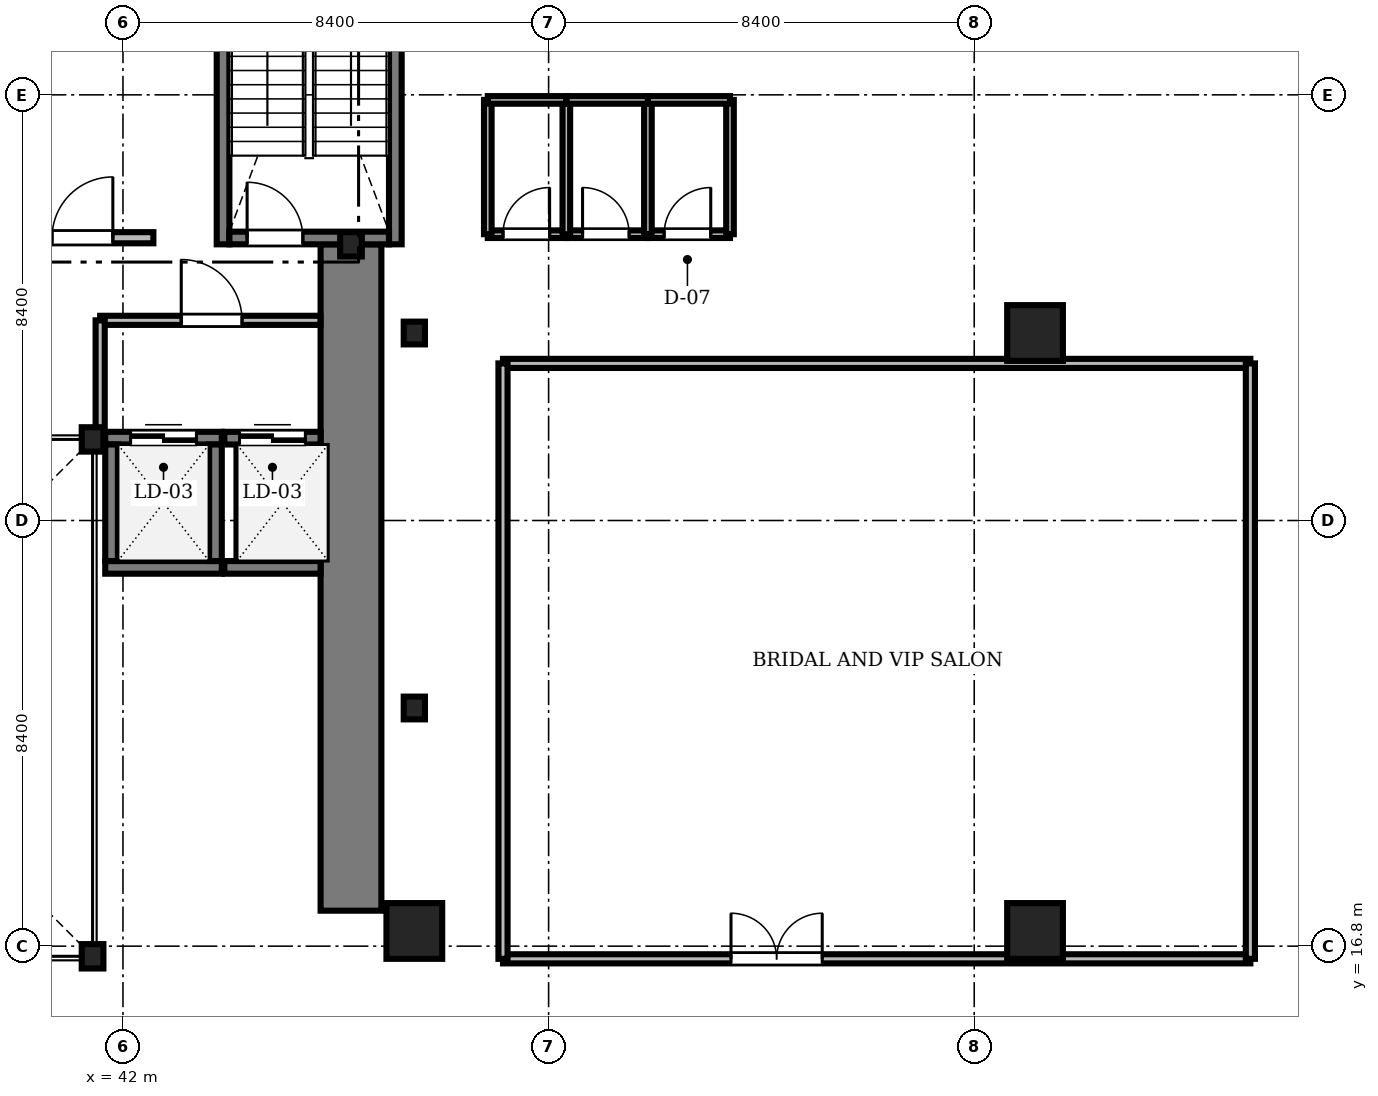
"""IFC4 building model, lengths in metres.
Left out: names, types, materials, properties, quantities, classifications, styles, units other than length and angle.
Written with IfcOpenShell. Run it as: python <this file> out.ifc"""

import sys

from ifc_helpers import new_model, si_unit, direction, frame, frame_2d, origin, origin_2d, place, context, subcontext, project, spatial, rectangle, i_section, extrude, source, transform, mapped, element, fill, save


model = new_model("IFC4")
c1 = context("Model", 3, precision=1e-05, world=origin(), true_north=direction((0.0, 1.0)))
c2 = subcontext(c1, "Body", "Model", "MODEL_VIEW")
j1 = project(units=[si_unit("LENGTHUNIT", "METRE"), si_unit("PLANEANGLEUNIT", "RADIAN")], contexts=[c1])
p1 = place(None, origin())
s1 = spatial("IfcSite", under=j1, at=p1, CompositionType="ELEMENT")
p2 = place(p1, origin())
s2 = spatial("IfcBuilding", under=s1, at=p2, CompositionType="ELEMENT")
p3 = place(p2, frame((0.0, 0.0, 17.0)))
s3 = spatial("IfcBuildingStorey", under=s2, at=p3, CompositionType="ELEMENT", Elevation=17.0)
m1 = source(origin(), c2, "Body", "SweptSolid", [
    extrude(rectangle(XDim=13.15, YDim=1.2, at=frame_2d((6.575, 0.0))), origin(), (0.0, 0.0, 1.0), 5.08),
])
p4 = place(p3, frame((46.5, 17.5, 0.0), z_axis=(0.0, 0.0, 1.0), x_axis=(0.0, 1.0, 0.0)))
e1 = element("IfcWall", 1, at=p4, inside=s3, PredefinedType="SHEAR", context=c2, shape_type="MappedRepresentation", body=[
    mapped(m1, transform((0.0, 0.0, 0.0), scale=1.0)),
])
m2 = source(origin(), c2, "Body", "SweptSolid", [
    extrude(i_section(OverallWidth=0.428, OverallDepth=0.481, WebThickness=0.04, FlangeThickness=0.063, FilletRadius=0.015, at=origin_2d()), origin(), (0.0, 0.0, 1.0), 5.08),
])
for number, where, z_axis, x_axis in (
    (2, (41.4, 16.6, 0.0), (0.0, 0.0, 1.0), (1.0, 0.0, 0.0)),
    (3, (41.4, 26.8, 0.0), (0.0, 0.0, 1.0), (1.0, 0.0, 0.0)),
    (4, (46.5, 30.65, 0.0), (0.0, 0.0, 1.0), (1.0, 0.0, 0.0)),
):
    element("IfcColumn", number, at=place(p3, frame(where, z_axis=z_axis, x_axis=x_axis)), inside=s3, PredefinedType="COLUMN", context=c2, shape_type="MappedRepresentation", body=[
        mapped(m2, transform((0.0, 0.0, 0.0), scale=1.0)),
    ])
m3 = source(origin(), c2, "Body", "SweptSolid", [
    extrude(rectangle(XDim=1.1, YDim=1.1, at=origin_2d()), origin(), (0.0, 0.0, 1.0), 5.08),
])
for number, where, z_axis, x_axis in (
    (5, (47.75, 17.1, 0.0), (0.0, 0.0, 1.0), (1.0, 0.0, 0.0)),
    (6, (60.0, 17.1, 0.0), (0.0, 0.0, 1.0), (1.0, 0.0, 0.0)),
    (7, (60.0, 28.9, 0.0), (0.0, 0.0, 1.0), (1.0, 0.0, 0.0)),
):
    element("IfcColumn", number, at=place(p3, frame(where, z_axis=z_axis, x_axis=x_axis)), inside=s3, PredefinedType="COLUMN", context=c2, shape_type="MappedRepresentation", body=[
        mapped(m3, transform((0.0, 0.0, 0.0), scale=1.0)),
    ])
m4 = source(origin(), c2, "Body", "SweptSolid", [
    extrude(i_section(OverallWidth=0.419, OverallDepth=0.449, WebThickness=0.031, FlangeThickness=0.048, FilletRadius=0.015, at=origin_2d()), origin(), (0.0, 0.0, 1.0), 5.08),
])
for number, where, z_axis, x_axis in (
    (8, (47.75, 21.5, 0.0), (0.0, 0.0, 1.0), (1.0, 0.0, 0.0)),
    (9, (47.75, 28.9, 0.0), (0.0, 0.0, 1.0), (1.0, 0.0, 0.0)),
):
    element("IfcColumn", number, at=place(p3, frame(where, z_axis=z_axis, x_axis=x_axis)), inside=s3, PredefinedType="COLUMN", context=c2, shape_type="MappedRepresentation", body=[
        mapped(m4, transform((0.0, 0.0, 0.0), scale=1.0)),
    ])
m5 = source(origin(), c2, "Body", "SweptSolid", [
    extrude(rectangle(XDim=9.05, YDim=0.25, at=frame_2d((4.525, 0.0))), origin(), (0.0, 0.0, 1.0), 5.2),
])
for number, where, z_axis, x_axis in (
    (10, (43.975, 30.65, 0.0), (0.0, 0.0, 1.0), (0.0, 1.0, 0.0)),
    (11, (47.375, 30.65, 0.0), (0.0, 0.0, 1.0), (0.0, 1.0, 0.0)),
):
    element("IfcWall", number, at=place(p3, frame(where, z_axis=z_axis, x_axis=x_axis)), inside=s3, PredefinedType="SOLIDWALL", context=c2, shape_type="MappedRepresentation", body=[
        mapped(m5, transform((0.0, 0.0, 0.0), scale=1.0)),
    ])
m6 = source(origin(), c2, "Body", "SweptSolid", [
    extrude(rectangle(XDim=3.15, YDim=0.25, at=frame_2d((1.575, 0.0))), origin(), (0.0, 0.0, 1.0), 5.2),
])
p5 = place(p3, frame((44.1, 30.775, 0.0), z_axis=(0.0, 0.0, 1.0), x_axis=(1.0, 0.0, 0.0)))
e12 = element("IfcWall", 12, at=p5, inside=s3, PredefinedType="SOLIDWALL", context=c2, shape_type="MappedRepresentation", body=[
    mapped(m6, transform((0.0, 0.0, 0.0), scale=1.0)),
])
m7 = source(origin(), c2, "Body", "SweptSolid", [
    extrude(rectangle(XDim=1.1, YDim=2.2, at=frame_2d((0.55, 1.1))), frame((0.0, 0.135, 0.0), z_axis=(0.0, -1.0, 0.0), x_axis=(1.0, 0.0, 0.0)), (0.0, 0.0, 1.0), 0.27),
])
p6 = place(p5, frame((0.35, 0.0, 0.0)))
e13 = element("IfcOpeningElement", 13, at=p6, cuts=e12, PredefinedType="OPENING", context=c2, shape_type="MappedRepresentation", body=[
    mapped(m7, transform((0.0, 0.0, 0.0), scale=1.0)),
])
m8 = source(origin(), c2, "Body", "SweptSolid", [
    extrude(rectangle(XDim=2.8, YDim=0.22, at=frame_2d((1.4, 0.0))), origin(), (0.0, 0.0, 1.0), 5.08),
])
p7 = place(p3, frame((39.8, 30.78, 0.0), z_axis=(0.0, 0.0, 1.0), x_axis=(1.0, 0.0, 0.0)))
e14 = element("IfcWall", 14, at=p7, inside=s3, PredefinedType="SOLIDWALL", context=c2, shape_type="MappedRepresentation", body=[
    mapped(m8, transform((0.0, 0.0, 0.0), scale=1.0)),
])
m9 = source(origin(), c2, "Body", "SweptSolid", [
    extrude(rectangle(XDim=1.2, YDim=2.2, at=frame_2d((0.6, 1.1))), frame((0.0, 0.12, 0.0), z_axis=(0.0, -1.0, 0.0), x_axis=(1.0, 0.0, 0.0)), (0.0, 0.0, 1.0), 0.24),
])
p8 = place(p7, frame((0.8, 0.0, 0.0)))
e15 = element("IfcOpeningElement", 15, at=p8, cuts=e14, PredefinedType="OPENING", context=c2, shape_type="MappedRepresentation", body=[
    mapped(m9, transform((0.0, 0.0, 0.0), scale=1.0)),
])
m10 = source(origin(), c2, "Body", "SweptSolid", [
    extrude(rectangle(XDim=2.3, YDim=0.25, at=frame_2d((1.15, 0.0))), origin(), (0.0, 0.0, 1.0), 5.08),
])
p9 = place(p3, frame((41.65, 24.275, 0.0), z_axis=(0.0, 0.0, 1.0), x_axis=(1.0, 0.0, 0.0)))
e16 = element("IfcWall", 16, at=p9, inside=s3, PredefinedType="SOLIDWALL", context=c2, shape_type="MappedRepresentation", body=[
    mapped(m10, transform((0.0, 0.0, 0.0), scale=1.0)),
])
p10 = place(p3, frame((41.65, 26.825, 0.0), z_axis=(0.0, 0.0, 1.0), x_axis=(1.0, 0.0, 0.0)))
e17 = element("IfcWall", 17, at=p10, inside=s3, PredefinedType="SOLIDWALL", context=c2, shape_type="MappedRepresentation", body=[
    mapped(m10, transform((0.0, 0.0, 0.0), scale=1.0)),
])
m11 = source(origin(), c2, "Body", "SweptSolid", [
    extrude(rectangle(XDim=1.3, YDim=2.3, at=frame_2d((0.65, 1.15))), frame((0.0, 0.135, 0.0), z_axis=(0.0, -1.0, 0.0), x_axis=(1.0, 0.0, 0.0)), (0.0, 0.0, 1.0), 0.27),
])
p11 = place(p10, frame((0.5, 0.0, 0.0)))
e18 = element("IfcOpeningElement", 18, at=p11, cuts=e17, PredefinedType="OPENING", context=c2, shape_type="MappedRepresentation", body=[
    mapped(m11, transform((0.0, 0.0, 0.0), scale=1.0)),
])
for number, where, z_axis, x_axis in (
    (19, (41.775, 24.4, 0.0), (0.0, 0.0, 1.0), (0.0, 1.0, 0.0)),
    (20, (43.825, 24.4, 0.0), (0.0, 0.0, 1.0), (0.0, 1.0, 0.0)),
):
    element("IfcWall", number, at=place(p3, frame(where, z_axis=z_axis, x_axis=x_axis)), inside=s3, PredefinedType="SOLIDWALL", context=c2, shape_type="MappedRepresentation", body=[
        mapped(m10, transform((0.0, 0.0, 0.0), scale=1.0)),
    ])
m12 = source(origin(), c2, "Body", "SweptSolid", [
    extrude(rectangle(XDim=1.9, YDim=0.25, at=frame_2d((0.95, 0.0))), origin(), (0.0, 0.0, 1.0), 5.08),
])
p12 = place(p3, frame((44.0, 24.275, 0.0), z_axis=(0.0, 0.0, 1.0), x_axis=(1.0, 0.0, 0.0)))
e21 = element("IfcWall", 21, at=p12, inside=s3, PredefinedType="SOLIDWALL", context=c2, shape_type="MappedRepresentation", body=[
    mapped(m12, transform((0.0, 0.0, 0.0), scale=1.0)),
])
p13 = place(p3, frame((44.0, 26.825, 0.0), z_axis=(0.0, 0.0, 1.0), x_axis=(1.0, 0.0, 0.0)))
e22 = element("IfcWall", 22, at=p13, inside=s3, PredefinedType="SOLIDWALL", context=c2, shape_type="MappedRepresentation", body=[
    mapped(m12, transform((0.0, 0.0, 0.0), scale=1.0)),
])
p14 = place(p13, frame((0.3, 0.0, 0.0)))
e23 = element("IfcOpeningElement", 23, at=p14, cuts=e22, PredefinedType="OPENING", context=c2, shape_type="MappedRepresentation", body=[
    mapped(m11, transform((0.0, 0.0, 0.0), scale=1.0)),
])
m13 = source(origin(), c2, "Body", "SweptSolid", [
    extrude(rectangle(XDim=14.75, YDim=0.18, at=frame_2d((7.375, 0.0))), origin(), (0.0, 0.0, 1.0), 4.472),
])
p15 = place(p3, frame((49.5, 16.55, 0.0), z_axis=(0.0, 0.0, 1.0), x_axis=(1.0, 0.0, 0.0)))
e24 = element("IfcWall", 24, at=p15, inside=s3, PredefinedType="PARTITIONING", context=c2, shape_type="MappedRepresentation", body=[
    mapped(m13, transform((0.0, 0.0, 0.0), scale=1.0)),
])
m14 = source(origin(), c2, "Body", "SweptSolid", [
    extrude(rectangle(XDim=1.8, YDim=2.4, at=frame_2d((0.9, 1.2))), frame((0.0, 0.1, 0.0), z_axis=(0.0, -1.0, 0.0), x_axis=(1.0, 0.0, 0.0)), (0.0, 0.0, 1.0), 0.2),
])
p16 = place(p15, frame((4.5, 0.0, 0.0)))
e25 = element("IfcOpeningElement", 25, at=p16, cuts=e24, PredefinedType="OPENING", context=c2, shape_type="MappedRepresentation", body=[
    mapped(m14, transform((0.0, 0.0, 0.0), scale=1.0)),
])
m15 = source(origin(), c2, "Body", "SweptSolid", [
    extrude(rectangle(XDim=4.348, YDim=0.18, at=frame_2d((2.174, 0.0))), origin(), (0.0, 0.0, 1.0), 4.712),
])
p17 = place(p3, frame((41.55, 29.15, 0.0), z_axis=(0.0, 0.0, 1.0), x_axis=(1.0, 0.0, 0.0)))
e26 = element("IfcWall", 26, at=p17, inside=s3, PredefinedType="PARTITIONING", context=c2, shape_type="MappedRepresentation", body=[
    mapped(m15, transform((0.0, 0.0, 0.0), scale=1.0)),
])
m16 = source(origin(), c2, "Body", "SweptSolid", [
    extrude(rectangle(XDim=1.2, YDim=2.2, at=frame_2d((0.6, 1.1))), frame((0.0, 0.1, 0.0), z_axis=(0.0, -1.0, 0.0), x_axis=(1.0, 0.0, 0.0)), (0.0, 0.0, 1.0), 0.2),
])
p18 = place(p17, frame((1.6, 0.0, 0.0)))
e27 = element("IfcOpeningElement", 27, at=p18, cuts=e26, PredefinedType="OPENING", context=c2, shape_type="MappedRepresentation", body=[
    mapped(m16, transform((0.0, 0.0, 0.0), scale=1.0)),
])
m17 = source(origin(), c2, "Body", "SweptSolid", [
    extrude(rectangle(XDim=1.62, YDim=0.15, at=frame_2d((0.81, 0.0))), origin(), (0.0, 0.0, 1.0), 5.08),
])
p19 = place(p3, frame((52.36, 30.85, 0.0), z_axis=(0.0, 0.0, 1.0), x_axis=(1.0, 0.0, 0.0)))
e28 = element("IfcWall", 28, at=p19, inside=s3, PredefinedType="PARTITIONING", context=c2, shape_type="MappedRepresentation", body=[
    mapped(m17, transform((0.0, 0.0, 0.0), scale=1.0)),
])
m18 = source(origin(), c2, "Body", "SweptSolid", [
    extrude(rectangle(XDim=0.92, YDim=2.1, at=frame_2d((0.46, 1.05))), frame((0.0, 0.085, 0.0), z_axis=(0.0, -1.0, 0.0), x_axis=(1.0, 0.0, 0.0)), (0.0, 0.0, 1.0), 0.17),
])
p20 = place(p19, frame((0.32, 0.0, 0.0)))
e29 = element("IfcOpeningElement", 29, at=p20, cuts=e28, PredefinedType="OPENING", context=c2, shape_type="MappedRepresentation", body=[
    mapped(m18, transform((0.0, 0.0, 0.0), scale=1.0)),
])
m19 = source(origin(), c2, "Body", "SweptSolid", [
    extrude(rectangle(XDim=1.61, YDim=0.15, at=frame_2d((0.805, 0.0))), origin(), (0.0, 0.0, 1.0), 5.08),
])
p21 = place(p3, frame((50.75, 30.85, 0.0), z_axis=(0.0, 0.0, 1.0), x_axis=(1.0, 0.0, 0.0)))
e30 = element("IfcWall", 30, at=p21, inside=s3, PredefinedType="PARTITIONING", context=c2, shape_type="MappedRepresentation", body=[
    mapped(m19, transform((0.0, 0.0, 0.0), scale=1.0)),
])
p22 = place(p21, frame((0.32, 0.0, 0.0)))
e31 = element("IfcOpeningElement", 31, at=p22, cuts=e30, PredefinedType="OPENING", context=c2, shape_type="MappedRepresentation", body=[
    mapped(m18, transform((0.0, 0.0, 0.0), scale=1.0)),
])
m20 = source(origin(), c2, "Body", "SweptSolid", [
    extrude(rectangle(XDim=1.55, YDim=0.15, at=frame_2d((0.775, 0.0))), origin(), (0.0, 0.0, 1.0), 5.08),
])
p23 = place(p3, frame((49.2, 30.85, 0.0), z_axis=(0.0, 0.0, 1.0), x_axis=(1.0, 0.0, 0.0)))
e32 = element("IfcWall", 32, at=p23, inside=s3, PredefinedType="PARTITIONING", context=c2, shape_type="MappedRepresentation", body=[
    mapped(m20, transform((0.0, 0.0, 0.0), scale=1.0)),
])
p24 = place(p23, frame((0.3, 0.0, 0.0)))
e33 = element("IfcOpeningElement", 33, at=p24, cuts=e32, PredefinedType="OPENING", context=c2, shape_type="MappedRepresentation", body=[
    mapped(m18, transform((0.0, 0.0, 0.0), scale=1.0)),
])
p25 = place(p3, frame((49.5, 28.3, 0.0), z_axis=(0.0, 0.0, 1.0), x_axis=(1.0, 0.0, 0.0)))
e34 = element("IfcWall", 34, at=p25, inside=s3, PredefinedType="PARTITIONING", context=c2, shape_type="MappedRepresentation", body=[
    mapped(m13, transform((0.0, 0.0, 0.0), scale=1.0)),
])
m21 = source(origin(), c2, "Body", "SweptSolid", [
    extrude(rectangle(XDim=11.75, YDim=0.18, at=frame_2d((5.875, 0.0))), origin(), (0.0, 0.0, 1.0), 4.548),
])
for number, where, z_axis, x_axis in (
    (35, (49.5, 16.55, 0.0), (0.0, 0.0, 1.0), (0.0, 1.0, 0.0)),
    (36, (64.25, 16.55, 0.0), (0.0, 0.0, 1.0), (0.0, 1.0, 0.0)),
):
    element("IfcWall", number, at=place(p3, frame(where, z_axis=z_axis, x_axis=x_axis)), inside=s3, PredefinedType="PARTITIONING", context=c2, shape_type="MappedRepresentation", body=[
        mapped(m21, transform((0.0, 0.0, 0.0), scale=1.0)),
    ])
m22 = source(origin(), c2, "Body", "SweptSolid", [
    extrude(rectangle(XDim=2.65, YDim=0.15, at=frame_2d((1.325, 0.0))), origin(), (0.0, 0.0, 1.0), 5.08),
])
for number, where, z_axis, x_axis in (
    (37, (49.2, 30.85, 0.0), (0.0, 0.0, 1.0), (0.0, 1.0, 0.0)),
    (38, (50.75, 30.85, 0.0), (0.0, 0.0, 1.0), (0.0, 1.0, 0.0)),
    (39, (52.36, 30.85, 0.0), (0.0, 0.0, 1.0), (0.0, 1.0, 0.0)),
    (40, (53.98, 30.85, 0.0), (0.0, 0.0, 1.0), (0.0, 1.0, 0.0)),
):
    element("IfcWall", number, at=place(p3, frame(where, z_axis=z_axis, x_axis=x_axis)), inside=s3, PredefinedType="PARTITIONING", context=c2, shape_type="MappedRepresentation", body=[
        mapped(m22, transform((0.0, 0.0, 0.0), scale=1.0)),
    ])
m23 = source(origin(), c2, "Body", "SweptSolid", [
    extrude(rectangle(XDim=2.35, YDim=0.18, at=frame_2d((1.175, 0.0))), origin(), (0.0, 0.0, 1.0), 4.712),
])
p26 = place(p3, frame((41.55, 26.8, 0.0), z_axis=(0.0, 0.0, 1.0), x_axis=(0.0, 1.0, 0.0)))
e41 = element("IfcWall", 41, at=p26, inside=s3, PredefinedType="PARTITIONING", context=c2, shape_type="MappedRepresentation", body=[
    mapped(m23, transform((0.0, 0.0, 0.0), scale=1.0)),
])
p27 = place(p3, frame((52.36, 33.5, 0.0), z_axis=(0.0, 0.0, 1.0), x_axis=(1.0, 0.0, 0.0)))
e42 = element("IfcWall", 42, at=p27, inside=s3, PredefinedType="PARTITIONING", context=c2, shape_type="MappedRepresentation", body=[
    mapped(m17, transform((0.0, 0.0, 0.0), scale=1.0)),
])
p28 = place(p3, frame((50.75, 33.5, 0.0), z_axis=(0.0, 0.0, 1.0), x_axis=(1.0, 0.0, 0.0)))
e43 = element("IfcWall", 43, at=p28, inside=s3, PredefinedType="PARTITIONING", context=c2, shape_type="MappedRepresentation", body=[
    mapped(m19, transform((0.0, 0.0, 0.0), scale=1.0)),
])
p29 = place(p3, frame((49.2, 33.5, 0.0), z_axis=(0.0, 0.0, 1.0), x_axis=(1.0, 0.0, 0.0)))
e44 = element("IfcWall", 44, at=p29, inside=s3, PredefinedType="PARTITIONING", context=c2, shape_type="MappedRepresentation", body=[
    mapped(m20, transform((0.0, 0.0, 0.0), scale=1.0)),
])
m24 = source(origin(), c2, "Body", "SweptSolid", [
    extrude(rectangle(XDim=1.1, YDim=2.2, at=frame_2d((0.55, 1.1))), frame((0.0, 0.025, 0.0), z_axis=(0.0, -1.0, 0.0), x_axis=(1.0, 0.0, 0.0)), (0.0, 0.0, 1.0), 0.05),
])
p30 = place(p6, origin())
e45 = element("IfcDoor", 45, at=p30, inside=s3, OperationType="SINGLE_SWING_LEFT", PredefinedType="DOOR", context=c2, shape_type="MappedRepresentation", body=[
    mapped(m24, transform((0.0, 0.0, 0.0), scale=1.0)),
])
fill(e13, e45)
m25 = source(origin(), c2, "Body", "SweptSolid", [
    extrude(rectangle(XDim=1.2, YDim=2.2, at=frame_2d((0.6, 1.1))), frame((0.0, 0.025, 0.0), z_axis=(0.0, -1.0, 0.0), x_axis=(1.0, 0.0, 0.0)), (0.0, 0.0, 1.0), 0.05),
])
p31 = place(p8, origin())
e46 = element("IfcDoor", 46, at=p31, inside=s3, OperationType="SINGLE_SWING_RIGHT", PredefinedType="DOOR", context=c2, shape_type="MappedRepresentation", body=[
    mapped(m25, transform((0.0, 0.0, 0.0), scale=1.0)),
])
fill(e15, e46)
m26 = source(origin(), c2, "Body", "SweptSolid", [
    extrude(rectangle(XDim=1.3, YDim=2.3, at=frame_2d((0.65, 1.15))), frame((0.0, 0.025, 0.0), z_axis=(0.0, -1.0, 0.0), x_axis=(1.0, 0.0, 0.0)), (0.0, 0.0, 1.0), 0.05),
])
p32 = place(p11, origin())
e47 = element("IfcDoor", 47, at=p32, inside=s3, OperationType="DOUBLE_DOOR_SLIDING", PredefinedType="DOOR", context=c2, shape_type="MappedRepresentation", body=[
    mapped(m26, transform((0.0, 0.0, 0.0), scale=1.0)),
])
fill(e18, e47)
p33 = place(p14, origin())
e48 = element("IfcDoor", 48, at=p33, inside=s3, OperationType="DOUBLE_DOOR_SLIDING", PredefinedType="DOOR", context=c2, shape_type="MappedRepresentation", body=[
    mapped(m26, transform((0.0, 0.0, 0.0), scale=1.0)),
])
fill(e23, e48)
m27 = source(origin(), c2, "Body", "SweptSolid", [
    extrude(rectangle(XDim=1.8, YDim=2.4, at=frame_2d((0.9, 1.2))), frame((0.0, 0.025, 0.0), z_axis=(0.0, -1.0, 0.0), x_axis=(1.0, 0.0, 0.0)), (0.0, 0.0, 1.0), 0.05),
])
p34 = place(p16, origin())
e49 = element("IfcDoor", 49, at=p34, inside=s3, OperationType="DOUBLE_DOOR_SINGLE_SWING", PredefinedType="DOOR", context=c2, shape_type="MappedRepresentation", body=[
    mapped(m27, transform((0.0, 0.0, 0.0), scale=1.0)),
])
fill(e25, e49)
p35 = place(p18, origin())
e50 = element("IfcDoor", 50, at=p35, inside=s3, OperationType="SINGLE_SWING_LEFT", PredefinedType="DOOR", context=c2, shape_type="MappedRepresentation", body=[
    mapped(m25, transform((0.0, 0.0, 0.0), scale=1.0)),
])
fill(e27, e50)
m28 = source(origin(), c2, "Body", "SweptSolid", [
    extrude(rectangle(XDim=0.92, YDim=2.1, at=frame_2d((0.46, 1.05))), frame((0.0, 0.025, 0.0), z_axis=(0.0, -1.0, 0.0), x_axis=(1.0, 0.0, 0.0)), (0.0, 0.0, 1.0), 0.05),
])
p36 = place(p20, origin())
e51 = element("IfcDoor", 51, at=p36, inside=s3, OperationType="SINGLE_SWING_RIGHT", PredefinedType="DOOR", context=c2, shape_type="MappedRepresentation", body=[
    mapped(m28, transform((0.0, 0.0, 0.0), scale=1.0)),
])
fill(e29, e51)
p37 = place(p22, origin())
e52 = element("IfcDoor", 52, at=p37, inside=s3, OperationType="SINGLE_SWING_LEFT", PredefinedType="DOOR", context=c2, shape_type="MappedRepresentation", body=[
    mapped(m28, transform((0.0, 0.0, 0.0), scale=1.0)),
])
fill(e31, e52)
p38 = place(p24, origin())
e53 = element("IfcDoor", 53, at=p38, inside=s3, OperationType="SINGLE_SWING_RIGHT", PredefinedType="DOOR", context=c2, shape_type="MappedRepresentation", body=[
    mapped(m28, transform((0.0, 0.0, 0.0), scale=1.0)),
])
fill(e33, e53)
save(model, sys.argv[1])
